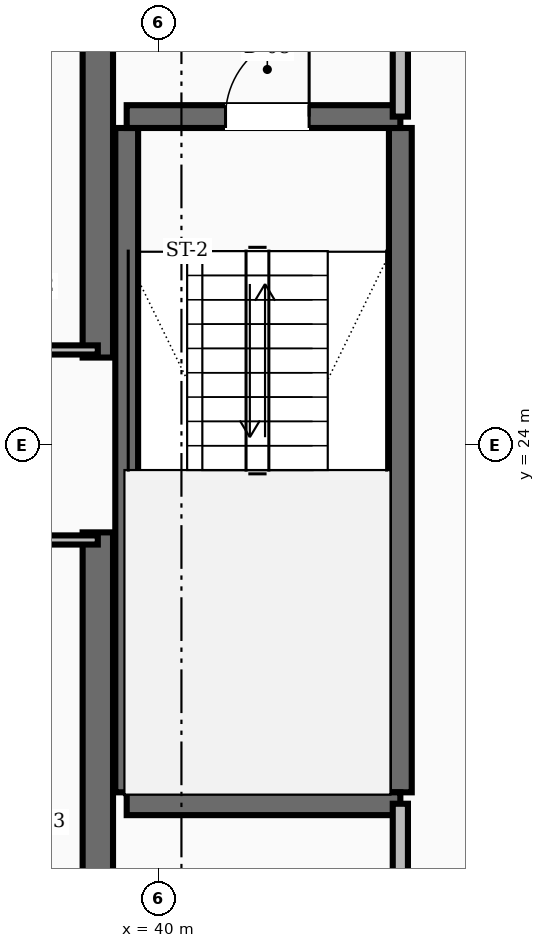
"""IFC4 building model, lengths in metres.
Left out: names, types, materials, properties, quantities, classifications, styles, units other than length and angle.
Written with IfcOpenShell. Run it as: python <this file> out.ifc"""

import sys

from ifc_helpers import new_model, si_unit, direction, frame, frame_2d, origin, place, context, subcontext, project, spatial, rectangle, extrude, element, fill, save


model = new_model("IFC4")
c1 = context("Model", 3, precision=1e-05, world=origin(), true_north=direction((0.0, 1.0)))
c2 = subcontext(c1, "Body", "Model", "MODEL_VIEW")
j1 = project(units=[si_unit("LENGTHUNIT", "METRE"), si_unit("PLANEANGLEUNIT", "RADIAN")], contexts=[c1])
p1 = place(None, origin())
s1 = spatial("IfcSite", under=j1, at=p1, CompositionType="ELEMENT")
p2 = place(p1, origin())
s2 = spatial("IfcBuilding", under=s1, at=p2, CompositionType="ELEMENT")
p3 = place(p2, frame((0.0, 0.0, 41.2)))
s3 = spatial("IfcBuildingStorey", under=s2, at=p3, CompositionType="ELEMENT", Elevation=41.2)
for number, where, z_axis, x_axis in (
    (1, (39.2, 16.55, 0.0), (0.0, 0.0, 1.0), (0.0, 1.0, 0.0)),
    (2, (39.2, 25.15, 0.0), (0.0, 0.0, 1.0), (0.0, 1.0, 0.0)),
):
    element("IfcWall", number, at=place(p3, frame(where, z_axis=z_axis, x_axis=x_axis)), inside=s3, PredefinedType="SHEAR", context=c2, shape_type="SweptSolid", body=[
        extrude(rectangle(XDim=6.3, YDim=0.4, at=frame_2d((3.15, 0.0))), origin(), (0.0, 0.0, 1.0), 3.6),
    ])
for number, where, z_axis, x_axis in (
    (3, (43.18, 19.43, 0.0), (0.0, 0.0, 1.0), (0.0, 1.0, 0.0)),
    (4, (39.58, 19.43, 0.0), (0.0, 0.0, 1.0), (0.0, 1.0, 0.0)),
):
    element("IfcWall", number, at=place(p3, frame(where, z_axis=z_axis, x_axis=x_axis)), inside=s3, PredefinedType="SHEAR", context=c2, shape_type="SweptSolid", body=[
        extrude(rectangle(XDim=8.74, YDim=0.3, at=frame_2d((4.37, 0.0))), origin(), (0.0, 0.0, 1.0), 3.6),
    ])
p4 = place(p3, frame((39.58, 19.28, 0.0), z_axis=(0.0, 0.0, 1.0), x_axis=(1.0, 0.0, 0.0)))
e5 = element("IfcWall", 5, at=p4, inside=s3, PredefinedType="SHEAR", context=c2, shape_type="SweptSolid", body=[
    extrude(rectangle(XDim=3.6, YDim=0.3, at=frame_2d((1.8, 0.0))), origin(), (0.0, 0.0, 1.0), 3.6),
])
p5 = place(p3, frame((39.58, 28.32, 0.0), z_axis=(0.0, 0.0, 1.0), x_axis=(1.0, 0.0, 0.0)))
e6 = element("IfcWall", 6, at=p5, inside=s3, PredefinedType="SHEAR", context=c2, shape_type="SweptSolid", body=[
    extrude(rectangle(XDim=3.6, YDim=0.3, at=frame_2d((1.8, 0.0))), origin(), (0.0, 0.0, 1.0), 3.6),
])
p6 = place(p5, frame((1.3, 0.0, 0.0)))
e7 = element("IfcOpeningElement", 7, at=p6, cuts=e6, PredefinedType="OPENING", context=c2, shape_type="SweptSolid", body=[
    extrude(rectangle(XDim=1.1, YDim=2.1, at=frame_2d((0.55, 1.05))), frame((0.0, 0.16, 0.0), z_axis=(0.0, -1.0, 0.0), x_axis=(1.0, 0.0, 0.0)), (0.0, 0.0, 1.0), 0.32),
])
p7 = place(p3, frame((43.18, 28.32, 0.0), z_axis=(0.0, 0.0, 1.0), x_axis=(0.0, 1.0, 0.0)))
e8 = element("IfcWall", 8, at=p7, inside=s3, PredefinedType="SOLIDWALL", context=c2, shape_type="SweptSolid", body=[
    extrude(rectangle(XDim=3.13, YDim=0.2, at=frame_2d((1.565, 0.0))), origin(), (0.0, 0.0, 1.0), 2.61),
])
p8 = place(p7, frame((1.015, 0.0, 0.0)))
e9 = element("IfcOpeningElement", 9, at=p8, cuts=e8, PredefinedType="OPENING", context=c2, shape_type="SweptSolid", body=[
    extrude(rectangle(XDim=1.1, YDim=2.1, at=frame_2d((0.55, 1.05))), frame((0.0, 0.11, 0.0), z_axis=(0.0, -1.0, 0.0), x_axis=(1.0, 0.0, 0.0)), (0.0, 0.0, 1.0), 0.22),
])
p9 = place(p3, frame((43.18, 16.55, 0.0), z_axis=(0.0, 0.0, 1.0), x_axis=(0.0, 1.0, 0.0)))
e10 = element("IfcWall", 10, at=p9, inside=s3, PredefinedType="SOLIDWALL", context=c2, shape_type="SweptSolid", body=[
    extrude(rectangle(XDim=2.73, YDim=0.2, at=frame_2d((1.365, 0.0))), origin(), (0.0, 0.0, 1.0), 2.61),
])
p10 = place(p9, frame((0.89, 0.0, 0.0)))
e11 = element("IfcOpeningElement", 11, at=p10, cuts=e10, PredefinedType="OPENING", context=c2, shape_type="SweptSolid", body=[
    extrude(rectangle(XDim=0.95, YDim=2.1, at=frame_2d((0.475, 1.05))), frame((0.0, 0.11, 0.0), z_axis=(0.0, -1.0, 0.0), x_axis=(1.0, 0.0, 0.0)), (0.0, 0.0, 1.0), 0.22),
])
for number, where, z_axis, x_axis in (
    (12, (37.4, 25.25, 0.0), (0.0, 0.0, 1.0), (1.0, 0.0, 0.0)),
    (13, (37.4, 22.75, 0.0), (0.0, 0.0, 1.0), (1.0, 0.0, 0.0)),
):
    element("IfcWall", number, at=place(p3, frame(where, z_axis=z_axis, x_axis=x_axis)), inside=s3, PredefinedType="PARTITIONING", context=c2, shape_type="SweptSolid", body=[
        extrude(rectangle(XDim=1.8, YDim=0.12, at=frame_2d((0.9, 0.0))), origin(), (0.0, 0.0, 1.0), 2.61),
    ])
p11 = place(p6, origin())
e14 = element("IfcDoor", 14, at=p11, inside=s3, OperationType="SINGLE_SWING_RIGHT", PredefinedType="DOOR", context=c2, shape_type="SweptSolid", body=[
    extrude(rectangle(XDim=1.1, YDim=2.1, at=frame_2d((0.55, 1.05))), frame((0.0, 0.025, 0.0), z_axis=(0.0, -1.0, 0.0), x_axis=(1.0, 0.0, 0.0)), (0.0, 0.0, 1.0), 0.05),
])
fill(e7, e14)
save(model, sys.argv[1])
